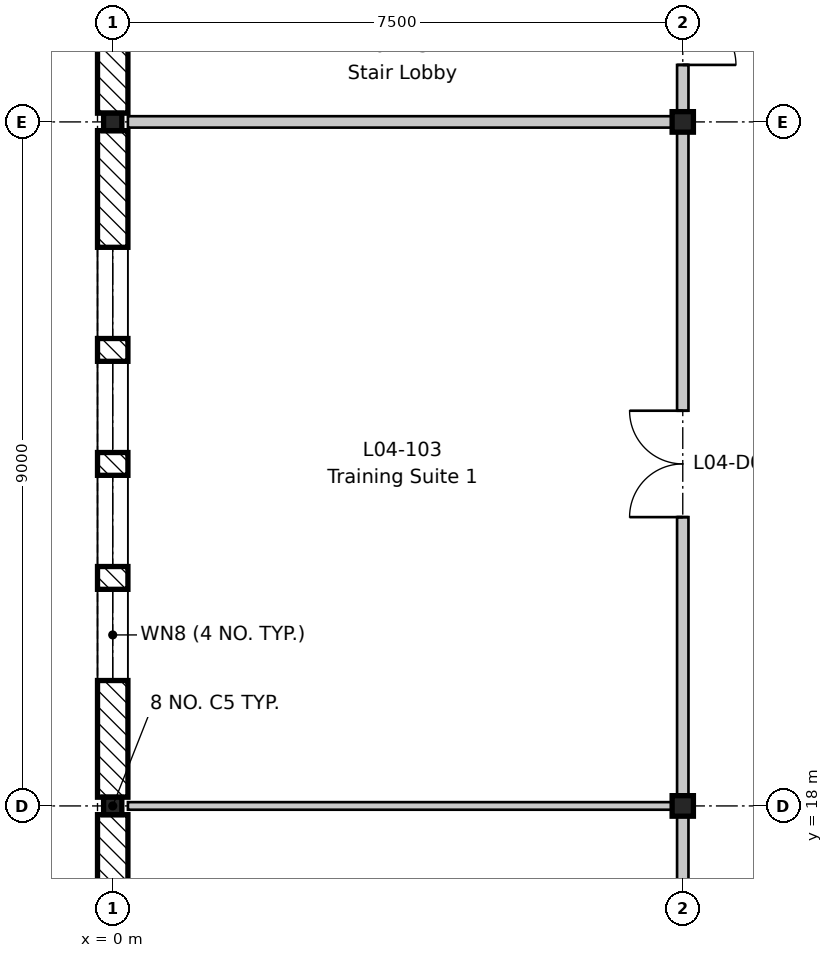
"""IFC4 building model, lengths in metres.
Left out: names, types, materials, properties, quantities, classifications, styles, units other than length and angle.
Written with IfcOpenShell. Run it as: python <this file> out.ifc"""

import sys

from ifc_helpers import new_model, si_unit, direction, frame, frame_2d, origin, origin_2d, place, context, subcontext, project, spatial, rectangle, i_section, extrude, element, fill, save


model = new_model("IFC4")
c1 = context("Model", 3, precision=1e-05, world=origin(), true_north=direction((0.0, 1.0)))
c2 = subcontext(c1, "Body", "Model", "MODEL_VIEW")
j1 = project(units=[si_unit("LENGTHUNIT", "METRE"), si_unit("PLANEANGLEUNIT", "RADIAN")], contexts=[c1])
p1 = place(None, origin())
s1 = spatial("IfcSite", under=j1, at=p1, CompositionType="ELEMENT")
p2 = place(p1, origin())
s2 = spatial("IfcBuilding", under=s1, at=p2, CompositionType="ELEMENT")
p3 = place(p2, frame((0.0, 0.0, 18.6)))
s3 = spatial("IfcBuildingStorey", under=s2, at=p3, CompositionType="ELEMENT", Elevation=18.6)
for number, where, z_axis, x_axis in (
    (1, (0.0, 18.0, -0.2), (0.0, 0.0, 1.0), (1.0, 0.0, 0.0)),
    (2, (0.0, 27.0, -0.2), (0.0, 0.0, 1.0), (1.0, 0.0, 0.0)),
):
    element("IfcColumn", number, at=place(p3, frame(where, z_axis=z_axis, x_axis=x_axis)), inside=s3, PredefinedType="COLUMN", context=c2, shape_type="SweptSolid", body=[
        extrude(i_section(OverallWidth=0.24, OverallDepth=0.23, WebThickness=0.008, FlangeThickness=0.012, FilletRadius=0.021, at=origin_2d()), origin(), (0.0, 0.0, 1.0), 4.2),
    ])
for number, where, z_axis, x_axis in (
    (3, (7.5, 18.0, -0.2), (0.0, 0.0, 1.0), (1.0, 0.0, 0.0)),
    (4, (7.5, 27.0, -0.2), (0.0, 0.0, 1.0), (1.0, 0.0, 0.0)),
):
    element("IfcColumn", number, at=place(p3, frame(where, z_axis=z_axis, x_axis=x_axis)), inside=s3, PredefinedType="COLUMN", context=c2, shape_type="SweptSolid", body=[
        extrude(i_section(OverallWidth=0.28, OverallDepth=0.27, WebThickness=0.008, FlangeThickness=0.013, FilletRadius=0.024, at=origin_2d()), origin(), (0.0, 0.0, 1.0), 4.2),
    ])
p4 = place(p3, frame((0.0, 9.115, 0.0), z_axis=(0.0, 0.0, 1.0), x_axis=(0.0, 1.0, 0.0)))
e5 = element("IfcWall", 5, at=p4, inside=s3, PredefinedType="STANDARD", context=c2, shape_type="SweptSolid", body=[
    extrude(rectangle(XDim=8.77, YDim=0.4, at=frame_2d((4.385, 0.0))), origin(), (0.0, 0.0, 1.0), 3.6),
])
p5 = place(p3, frame((0.0, 18.115, 0.0), z_axis=(0.0, 0.0, 1.0), x_axis=(0.0, 1.0, 0.0)))
e6 = element("IfcWall", 6, at=p5, inside=s3, PredefinedType="STANDARD", context=c2, shape_type="SweptSolid", body=[
    extrude(rectangle(XDim=8.77, YDim=0.4, at=frame_2d((4.385, 0.0))), origin(), (0.0, 0.0, 1.0), 3.6),
])
p6 = place(p5, frame((1.535, 0.0, 0.6)))
e7 = element("IfcOpeningElement", 7, at=p6, cuts=e6, PredefinedType="OPENING", context=c2, shape_type="SweptSolid", body=[
    extrude(rectangle(XDim=1.2, YDim=2.7, at=frame_2d((0.6, 1.35))), frame((0.0, 0.21, 0.0), z_axis=(0.0, -1.0, 0.0), x_axis=(1.0, 0.0, 0.0)), (0.0, 0.0, 1.0), 0.42),
])
p7 = place(p5, frame((3.035, 0.0, 0.6)))
e8 = element("IfcOpeningElement", 8, at=p7, cuts=e6, PredefinedType="OPENING", context=c2, shape_type="SweptSolid", body=[
    extrude(rectangle(XDim=1.2, YDim=2.7, at=frame_2d((0.6, 1.35))), frame((0.0, 0.21, 0.0), z_axis=(0.0, -1.0, 0.0), x_axis=(1.0, 0.0, 0.0)), (0.0, 0.0, 1.0), 0.42),
])
p8 = place(p5, frame((4.535, 0.0, 0.6)))
e9 = element("IfcOpeningElement", 9, at=p8, cuts=e6, PredefinedType="OPENING", context=c2, shape_type="SweptSolid", body=[
    extrude(rectangle(XDim=1.2, YDim=2.7, at=frame_2d((0.6, 1.35))), frame((0.0, 0.21, 0.0), z_axis=(0.0, -1.0, 0.0), x_axis=(1.0, 0.0, 0.0)), (0.0, 0.0, 1.0), 0.42),
])
p9 = place(p5, frame((6.035, 0.0, 0.6)))
e10 = element("IfcOpeningElement", 10, at=p9, cuts=e6, PredefinedType="OPENING", context=c2, shape_type="SweptSolid", body=[
    extrude(rectangle(XDim=1.2, YDim=2.7, at=frame_2d((0.6, 1.35))), frame((0.0, 0.21, 0.0), z_axis=(0.0, -1.0, 0.0), x_axis=(1.0, 0.0, 0.0)), (0.0, 0.0, 1.0), 0.42),
])
p10 = place(p3, frame((0.0, 27.115, 0.0), z_axis=(0.0, 0.0, 1.0), x_axis=(0.0, 1.0, 0.0)))
e11 = element("IfcWall", 11, at=p10, inside=s3, PredefinedType="STANDARD", context=c2, shape_type="SweptSolid", body=[
    extrude(rectangle(XDim=8.77, YDim=0.4, at=frame_2d((4.385, 0.0))), origin(), (0.0, 0.0, 1.0), 3.6),
])
p11 = place(p10, frame((3.11, 0.0, 0.9)))
e12 = element("IfcOpeningElement", 12, at=p11, cuts=e11, PredefinedType="OPENING", context=c2, shape_type="SweptSolid", body=[
    extrude(rectangle(XDim=1.05, YDim=2.6, at=frame_2d((0.525, 1.3))), frame((0.0, 0.21, 0.0), z_axis=(0.0, -1.0, 0.0), x_axis=(1.0, 0.0, 0.0)), (0.0, 0.0, 1.0), 0.42),
])
p12 = place(p10, frame((4.61, 0.0, 0.9)))
e13 = element("IfcOpeningElement", 13, at=p12, cuts=e11, PredefinedType="OPENING", context=c2, shape_type="SweptSolid", body=[
    extrude(rectangle(XDim=1.05, YDim=2.6, at=frame_2d((0.525, 1.3))), frame((0.0, 0.21, 0.0), z_axis=(0.0, -1.0, 0.0), x_axis=(1.0, 0.0, 0.0)), (0.0, 0.0, 1.0), 0.42),
])
p13 = place(p3, frame((0.2, 18.0, 0.0), z_axis=(0.0, 0.0, 1.0), x_axis=(1.0, 0.0, 0.0)))
e14 = element("IfcWall", 14, at=p13, inside=s3, PredefinedType="PARTITIONING", context=c2, shape_type="SweptSolid", body=[
    extrude(rectangle(XDim=7.225, YDim=0.1, at=frame_2d((3.613, 0.0))), origin(), (0.0, 0.0, 1.0), 3.65),
])
p14 = place(p3, frame((0.2, 27.0, 0.0), z_axis=(0.0, 0.0, 1.0), x_axis=(1.0, 0.0, 0.0)))
e15 = element("IfcWall", 15, at=p14, inside=s3, PredefinedType="PARTITIONING", context=c2, shape_type="SweptSolid", body=[
    extrude(rectangle(XDim=7.225, YDim=0.15, at=frame_2d((3.613, 0.0))), origin(), (0.0, 0.0, 1.0), 3.65),
])
p15 = place(p3, frame((7.5, -8.8, 0.0), z_axis=(0.0, 0.0, 1.0), x_axis=(0.0, 1.0, 0.0)))
e16 = element("IfcWall", 16, at=p15, inside=s3, PredefinedType="PARTITIONING", context=c2, shape_type="SweptSolid", body=[
    extrude(rectangle(XDim=79.3, YDim=0.15, at=frame_2d((39.65, 0.0))), origin(), (0.0, 0.0, 1.0), 3.48),
])
p16 = place(p15, frame((20.3, 0.0, 0.0)))
e17 = element("IfcOpeningElement", 17, at=p16, cuts=e16, PredefinedType="OPENING", context=c2, shape_type="SweptSolid", body=[
    extrude(rectangle(XDim=1.0, YDim=2.1, at=frame_2d((0.5, 1.05))), frame((0.0, 0.085, 0.0), z_axis=(0.0, -1.0, 0.0), x_axis=(1.0, 0.0, 0.0)), (0.0, 0.0, 1.0), 0.17),
])
p17 = place(p15, frame((24.8, 0.0, 0.0)))
e18 = element("IfcOpeningElement", 18, at=p17, cuts=e16, PredefinedType="OPENING", context=c2, shape_type="SweptSolid", body=[
    extrude(rectangle(XDim=1.0, YDim=2.1, at=frame_2d((0.5, 1.05))), frame((0.0, 0.085, 0.0), z_axis=(0.0, -1.0, 0.0), x_axis=(1.0, 0.0, 0.0)), (0.0, 0.0, 1.0), 0.17),
])
p18 = place(p15, frame((30.6, 0.0, 0.0)))
e19 = element("IfcOpeningElement", 19, at=p18, cuts=e16, PredefinedType="OPENING", context=c2, shape_type="SweptSolid", body=[
    extrude(rectangle(XDim=1.4, YDim=2.1, at=frame_2d((0.7, 1.05))), frame((0.0, 0.085, 0.0), z_axis=(0.0, -1.0, 0.0), x_axis=(1.0, 0.0, 0.0)), (0.0, 0.0, 1.0), 0.17),
])
p19 = place(p15, frame((47.3, 0.0, 0.0)))
e20 = element("IfcOpeningElement", 20, at=p19, cuts=e16, PredefinedType="OPENING", context=c2, shape_type="SweptSolid", body=[
    extrude(rectangle(XDim=1.0, YDim=2.1, at=frame_2d((0.5, 1.05))), frame((0.0, 0.085, 0.0), z_axis=(0.0, -1.0, 0.0), x_axis=(1.0, 0.0, 0.0)), (0.0, 0.0, 1.0), 0.17),
])
p20 = place(p15, frame((51.8, 0.0, 0.0)))
e21 = element("IfcOpeningElement", 21, at=p20, cuts=e16, PredefinedType="OPENING", context=c2, shape_type="SweptSolid", body=[
    extrude(rectangle(XDim=1.0, YDim=2.1, at=frame_2d((0.5, 1.05))), frame((0.0, 0.085, 0.0), z_axis=(0.0, -1.0, 0.0), x_axis=(1.0, 0.0, 0.0)), (0.0, 0.0, 1.0), 0.17),
])
p21 = place(p15, frame((54.8, 0.0, 0.0)))
e22 = element("IfcOpeningElement", 22, at=p21, cuts=e16, PredefinedType="OPENING", context=c2, shape_type="SweptSolid", body=[
    extrude(rectangle(XDim=1.0, YDim=2.1, at=frame_2d((0.5, 1.05))), frame((0.0, 0.085, 0.0), z_axis=(0.0, -1.0, 0.0), x_axis=(1.0, 0.0, 0.0)), (0.0, 0.0, 1.0), 0.17),
])
p22 = place(p15, frame((59.3, 0.0, 0.0)))
e23 = element("IfcOpeningElement", 23, at=p22, cuts=e16, PredefinedType="OPENING", context=c2, shape_type="SweptSolid", body=[
    extrude(rectangle(XDim=1.0, YDim=2.1, at=frame_2d((0.5, 1.05))), frame((0.0, 0.085, 0.0), z_axis=(0.0, -1.0, 0.0), x_axis=(1.0, 0.0, 0.0)), (0.0, 0.0, 1.0), 0.17),
])
p23 = place(p15, frame((12.6, 0.0, 0.0)))
e24 = element("IfcOpeningElement", 24, at=p23, cuts=e16, PredefinedType="OPENING", context=c2, shape_type="SweptSolid", body=[
    extrude(rectangle(XDim=1.4, YDim=2.1, at=frame_2d((0.7, 1.05))), frame((0.0, 0.085, 0.0), z_axis=(0.0, -1.0, 0.0), x_axis=(1.0, 0.0, 0.0)), (0.0, 0.0, 1.0), 0.17),
])
p24 = place(p15, frame((3.6, 0.0, 0.0)))
e25 = element("IfcOpeningElement", 25, at=p24, cuts=e16, PredefinedType="OPENING", context=c2, shape_type="SweptSolid", body=[
    extrude(rectangle(XDim=1.4, YDim=2.1, at=frame_2d((0.7, 1.05))), frame((0.0, 0.085, 0.0), z_axis=(0.0, -1.0, 0.0), x_axis=(1.0, 0.0, 0.0)), (0.0, 0.0, 1.0), 0.17),
])
p25 = place(p15, frame((63.55, 0.0, 0.0)))
e26 = element("IfcOpeningElement", 26, at=p25, cuts=e16, PredefinedType="OPENING", context=c2, shape_type="SweptSolid", body=[
    extrude(rectangle(XDim=1.4, YDim=2.1, at=frame_2d((0.7, 1.05))), frame((0.0, 0.085, 0.0), z_axis=(0.0, -1.0, 0.0), x_axis=(1.0, 0.0, 0.0)), (0.0, 0.0, 1.0), 0.17),
])
p26 = place(p15, frame((69.6, 0.0, 0.0)))
e27 = element("IfcOpeningElement", 27, at=p26, cuts=e16, PredefinedType="OPENING", context=c2, shape_type="SweptSolid", body=[
    extrude(rectangle(XDim=1.4, YDim=2.1, at=frame_2d((0.7, 1.05))), frame((0.0, 0.085, 0.0), z_axis=(0.0, -1.0, 0.0), x_axis=(1.0, 0.0, 0.0)), (0.0, 0.0, 1.0), 0.17),
])
p27 = place(p15, frame((42.85, 0.0, 0.0)))
e28 = element("IfcOpeningElement", 28, at=p27, cuts=e16, PredefinedType="OPENING", context=c2, shape_type="SweptSolid", body=[
    extrude(rectangle(XDim=1.0, YDim=2.1, at=frame_2d((0.5, 1.05))), frame((0.0, 0.085, 0.0), z_axis=(0.0, -1.0, 0.0), x_axis=(1.0, 0.0, 0.0)), (0.0, 0.0, 1.0), 0.17),
])
p28 = place(p15, frame((36.55, 0.0, 0.0)))
e29 = element("IfcOpeningElement", 29, at=p28, cuts=e16, PredefinedType="OPENING", context=c2, shape_type="SweptSolid", body=[
    extrude(rectangle(XDim=1.4, YDim=2.1, at=frame_2d((0.7, 1.05))), frame((0.0, 0.085, 0.0), z_axis=(0.0, -1.0, 0.0), x_axis=(1.0, 0.0, 0.0)), (0.0, 0.0, 1.0), 0.17),
])
p29 = place(p15, frame((72.8, 0.0, 0.0)))
e30 = element("IfcOpeningElement", 30, at=p29, cuts=e16, PredefinedType="OPENING", context=c2, shape_type="SweptSolid", body=[
    extrude(rectangle(XDim=1.0, YDim=2.1, at=frame_2d((0.5, 1.05))), frame((0.0, 0.085, 0.0), z_axis=(0.0, -1.0, 0.0), x_axis=(1.0, 0.0, 0.0)), (0.0, 0.0, 1.0), 0.17),
])
p30 = place(p6, origin())
e31 = element("IfcWindow", 31, at=p30, inside=s3, PartitioningType="SINGLE_PANEL", PredefinedType="WINDOW", context=c2, shape_type="SweptSolid", body=[
    extrude(rectangle(XDim=1.2, YDim=2.7, at=frame_2d((0.6, 1.35))), frame((0.0, 0.03, 0.0), z_axis=(0.0, -1.0, 0.0), x_axis=(1.0, 0.0, 0.0)), (0.0, 0.0, 1.0), 0.06),
])
fill(e7, e31)
p31 = place(p7, origin())
e32 = element("IfcWindow", 32, at=p31, inside=s3, PartitioningType="SINGLE_PANEL", PredefinedType="WINDOW", context=c2, shape_type="SweptSolid", body=[
    extrude(rectangle(XDim=1.2, YDim=2.7, at=frame_2d((0.6, 1.35))), frame((0.0, 0.03, 0.0), z_axis=(0.0, -1.0, 0.0), x_axis=(1.0, 0.0, 0.0)), (0.0, 0.0, 1.0), 0.06),
])
fill(e8, e32)
p32 = place(p8, origin())
e33 = element("IfcWindow", 33, at=p32, inside=s3, PartitioningType="SINGLE_PANEL", PredefinedType="WINDOW", context=c2, shape_type="SweptSolid", body=[
    extrude(rectangle(XDim=1.2, YDim=2.7, at=frame_2d((0.6, 1.35))), frame((0.0, 0.03, 0.0), z_axis=(0.0, -1.0, 0.0), x_axis=(1.0, 0.0, 0.0)), (0.0, 0.0, 1.0), 0.06),
])
fill(e9, e33)
p33 = place(p9, origin())
e34 = element("IfcWindow", 34, at=p33, inside=s3, PartitioningType="SINGLE_PANEL", PredefinedType="WINDOW", context=c2, shape_type="SweptSolid", body=[
    extrude(rectangle(XDim=1.2, YDim=2.7, at=frame_2d((0.6, 1.35))), frame((0.0, 0.03, 0.0), z_axis=(0.0, -1.0, 0.0), x_axis=(1.0, 0.0, 0.0)), (0.0, 0.0, 1.0), 0.06),
])
fill(e10, e34)
p34 = place(p18, origin())
e35 = element("IfcDoor", 35, at=p34, inside=s3, OperationType="DOUBLE_DOOR_SINGLE_SWING", PredefinedType="DOOR", context=c2, shape_type="SweptSolid", body=[
    extrude(rectangle(XDim=1.4, YDim=2.1, at=frame_2d((0.7, 1.05))), frame((0.0, 0.025, 0.0), z_axis=(0.0, -1.0, 0.0), x_axis=(1.0, 0.0, 0.0)), (0.0, 0.0, 1.0), 0.05),
])
fill(e19, e35)
p35 = place(p28, frame((1.4, 0.0, 0.0), z_axis=(0.0, 0.0, 1.0), x_axis=(-1.0, 0.0, 0.0)))
e36 = element("IfcDoor", 36, at=p35, inside=s3, OperationType="DOUBLE_DOOR_SINGLE_SWING", PredefinedType="DOOR", context=c2, shape_type="SweptSolid", body=[
    extrude(rectangle(XDim=1.4, YDim=2.1, at=frame_2d((0.7, 1.05))), frame((0.0, 0.025, 0.0), z_axis=(0.0, -1.0, 0.0), x_axis=(1.0, 0.0, 0.0)), (0.0, 0.0, 1.0), 0.05),
])
fill(e29, e36)
save(model, sys.argv[1])
